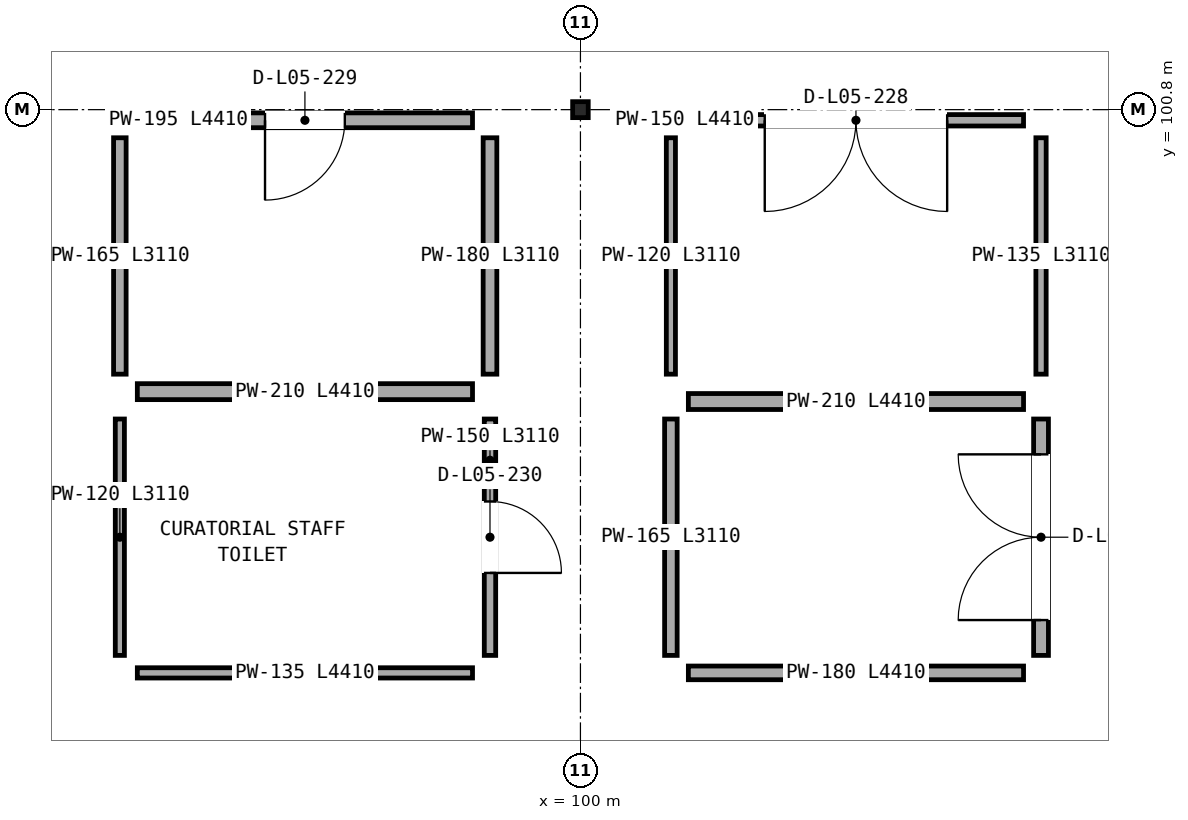
"""IFC4 building model, lengths in metres.
Left out: names, types, materials, properties, quantities, classifications, styles, units other than length and angle.
Written with IfcOpenShell. Run it as: python <this file> out.ifc"""

import sys

from ifc_helpers import new_model, si_unit, direction, frame, frame_2d, origin, origin_2d, place, context, subcontext, project, spatial, rectangle, i_section, extrude, element, fill, save


model = new_model("IFC4")
c1 = context("Model", 3, precision=1e-05, world=origin(), true_north=direction((0.0, 1.0)))
c2 = subcontext(c1, "Body", "Model", "MODEL_VIEW")
j1 = project(units=[si_unit("LENGTHUNIT", "METRE"), si_unit("PLANEANGLEUNIT", "RADIAN")], contexts=[c1])
p1 = place(None, origin())
s1 = spatial("IfcSite", under=j1, at=p1, CompositionType="ELEMENT")
p2 = place(p1, origin())
s2 = spatial("IfcBuilding", under=s1, at=p2, CompositionType="ELEMENT")
p3 = place(p2, frame((0.0, 0.0, 28.1)))
s3 = spatial("IfcBuildingStorey", under=s2, at=p3, CompositionType="ELEMENT", Elevation=28.1)
p4 = place(p3, frame((100.0, 100.8, 0.0), z_axis=(0.0, 0.0, 1.0), x_axis=(1.0, 0.0, 0.0)))
e1 = element("IfcColumn", 1, at=p4, inside=s3, PredefinedType="COLUMN", context=c2, shape_type="SweptSolid", body=[
    extrude(i_section(OverallWidth=0.205, OverallDepth=0.21, WebThickness=0.009, FlangeThickness=0.014, FilletRadius=0.01, at=origin_2d()), origin(), (0.0, 0.0, 1.0), 4.5),
])
p5 = place(p3, frame((101.42, 96.96, 0.0), z_axis=(0.0, 0.0, 1.0), x_axis=(1.0, 0.0, 0.0)))
e2 = element("IfcWall", 2, at=p5, inside=s3, PredefinedType="PARTITIONING", context=c2, shape_type="SweptSolid", body=[
    extrude(rectangle(XDim=4.41, YDim=0.21, at=frame_2d((2.205, 0.0))), origin(), (0.0, 0.0, 1.0), 3.913),
])
p6 = place(p3, frame((106.06, 96.73, 0.0), z_axis=(0.0, 0.0, 1.0), x_axis=(0.0, -1.0, 0.0)))
e3 = element("IfcWall", 3, at=p6, inside=s3, PredefinedType="PARTITIONING", context=c2, shape_type="SweptSolid", body=[
    extrude(rectangle(XDim=3.11, YDim=0.195, at=frame_2d((1.555, 0.0))), origin(), (0.0, 0.0, 1.0), 4.13),
])
p7 = place(p6, frame((0.465, 0.0, 0.0)))
e4 = element("IfcOpeningElement", 4, at=p7, cuts=e3, PredefinedType="OPENING", context=c2, shape_type="SweptSolid", body=[
    extrude(rectangle(XDim=2.18, YDim=2.58, at=frame_2d((1.09, 1.29))), frame((0.0, 0.107, 0.0), z_axis=(0.0, -1.0, 0.0), x_axis=(1.0, 0.0, 0.0)), (0.0, 0.0, 1.0), 0.215),
])
p8 = place(p3, frame((105.83, 93.39, 0.0), z_axis=(0.0, 0.0, 1.0), x_axis=(-1.0, 0.0, 0.0)))
e5 = element("IfcWall", 5, at=p8, inside=s3, PredefinedType="PARTITIONING", context=c2, shape_type="SweptSolid", body=[
    extrude(rectangle(XDim=4.41, YDim=0.18, at=frame_2d((2.205, 0.0))), origin(), (0.0, 0.0, 1.0), 3.913),
])
p9 = place(p3, frame((101.19, 93.62, 0.0), z_axis=(0.0, 0.0, 1.0), x_axis=(0.0, 1.0, 0.0)))
e6 = element("IfcWall", 6, at=p9, inside=s3, PredefinedType="PARTITIONING", context=c2, shape_type="SweptSolid", body=[
    extrude(rectangle(XDim=3.11, YDim=0.165, at=frame_2d((1.555, 0.0))), origin(), (0.0, 0.0, 1.0), 4.13),
])
p10 = place(p3, frame((101.42, 100.66, 0.0), z_axis=(0.0, 0.0, 1.0), x_axis=(1.0, 0.0, 0.0)))
e7 = element("IfcWall", 7, at=p10, inside=s3, PredefinedType="PARTITIONING", context=c2, shape_type="SweptSolid", body=[
    extrude(rectangle(XDim=4.41, YDim=0.15, at=frame_2d((2.205, 0.0))), origin(), (0.0, 0.0, 1.0), 3.687),
])
p11 = place(p10, frame((1.005, 0.0, 0.0)))
e8 = element("IfcOpeningElement", 8, at=p11, cuts=e7, PredefinedType="OPENING", context=c2, shape_type="SweptSolid", body=[
    extrude(rectangle(XDim=2.4, YDim=2.58, at=frame_2d((1.2, 1.29))), frame((0.0, 0.085, 0.0), z_axis=(0.0, -1.0, 0.0), x_axis=(1.0, 0.0, 0.0)), (0.0, 0.0, 1.0), 0.17),
])
p12 = place(p3, frame((106.06, 100.43, 0.0), z_axis=(0.0, 0.0, 1.0), x_axis=(0.0, -1.0, 0.0)))
e9 = element("IfcWall", 9, at=p12, inside=s3, PredefinedType="PARTITIONING", context=c2, shape_type="SweptSolid", body=[
    extrude(rectangle(XDim=3.11, YDim=0.135, at=frame_2d((1.555, 0.0))), origin(), (0.0, 0.0, 1.0), 4.13),
])
p13 = place(p3, frame((101.19, 97.32, 0.0), z_axis=(0.0, 0.0, 1.0), x_axis=(0.0, 1.0, 0.0)))
e10 = element("IfcWall", 10, at=p13, inside=s3, PredefinedType="PARTITIONING", context=c2, shape_type="SweptSolid", body=[
    extrude(rectangle(XDim=3.11, YDim=0.12, at=frame_2d((1.555, 0.0))), origin(), (0.0, 0.0, 1.0), 4.13),
])
p14 = place(p3, frame((98.58, 97.09, 0.0), z_axis=(0.0, 0.0, 1.0), x_axis=(-1.0, 0.0, 0.0)))
e11 = element("IfcWall", 11, at=p14, inside=s3, PredefinedType="PARTITIONING", context=c2, shape_type="SweptSolid", body=[
    extrude(rectangle(XDim=4.41, YDim=0.21, at=frame_2d((2.205, 0.0))), origin(), (0.0, 0.0, 1.0), 3.864),
])
p15 = place(p3, frame((94.17, 100.66, 0.0), z_axis=(0.0, 0.0, 1.0), x_axis=(1.0, 0.0, 0.0)))
e12 = element("IfcWall", 12, at=p15, inside=s3, PredefinedType="PARTITIONING", context=c2, shape_type="SweptSolid", body=[
    extrude(rectangle(XDim=4.41, YDim=0.195, at=frame_2d((2.205, 0.0))), origin(), (0.0, 0.0, 1.0), 3.687),
])
p16 = place(p15, frame((1.68, 0.0, 0.0)))
e13 = element("IfcOpeningElement", 13, at=p16, cuts=e12, PredefinedType="OPENING", context=c2, shape_type="SweptSolid", body=[
    extrude(rectangle(XDim=1.05, YDim=2.15, at=frame_2d((0.525, 1.075))), frame((0.0, 0.107, 0.0), z_axis=(0.0, -1.0, 0.0), x_axis=(1.0, 0.0, 0.0)), (0.0, 0.0, 1.0), 0.215),
])
p17 = place(p3, frame((98.81, 100.43, 0.0), z_axis=(0.0, 0.0, 1.0), x_axis=(0.0, -1.0, 0.0)))
e14 = element("IfcWall", 14, at=p17, inside=s3, PredefinedType="PARTITIONING", context=c2, shape_type="SweptSolid", body=[
    extrude(rectangle(XDim=3.11, YDim=0.18, at=frame_2d((1.555, 0.0))), origin(), (0.0, 0.0, 1.0), 4.13),
])
p18 = place(p3, frame((93.94, 97.32, 0.0), z_axis=(0.0, 0.0, 1.0), x_axis=(0.0, 1.0, 0.0)))
e15 = element("IfcWall", 15, at=p18, inside=s3, PredefinedType="PARTITIONING", context=c2, shape_type="SweptSolid", body=[
    extrude(rectangle(XDim=3.11, YDim=0.165, at=frame_2d((1.555, 0.0))), origin(), (0.0, 0.0, 1.0), 4.13),
])
p19 = place(p3, frame((98.81, 96.73, 0.0), z_axis=(0.0, 0.0, 1.0), x_axis=(0.0, -1.0, 0.0)))
e16 = element("IfcWall", 16, at=p19, inside=s3, PredefinedType="PARTITIONING", context=c2, shape_type="SweptSolid", body=[
    extrude(rectangle(XDim=3.11, YDim=0.15, at=frame_2d((1.555, 0.0))), origin(), (0.0, 0.0, 1.0), 4.13),
])
p20 = place(p19, frame((1.085, 0.0, 0.0)))
e17 = element("IfcOpeningElement", 17, at=p20, cuts=e16, PredefinedType="OPENING", context=c2, shape_type="SweptSolid", body=[
    extrude(rectangle(XDim=0.94, YDim=2.08, at=frame_2d((0.47, 1.04))), frame((0.0, 0.085, 0.0), z_axis=(0.0, -1.0, 0.0), x_axis=(1.0, 0.0, 0.0)), (0.0, 0.0, 1.0), 0.17),
])
p21 = place(p3, frame((98.58, 93.39, 0.0), z_axis=(0.0, 0.0, 1.0), x_axis=(-1.0, 0.0, 0.0)))
e18 = element("IfcWall", 18, at=p21, inside=s3, PredefinedType="PARTITIONING", context=c2, shape_type="SweptSolid", body=[
    extrude(rectangle(XDim=4.41, YDim=0.135, at=frame_2d((2.205, 0.0))), origin(), (0.0, 0.0, 1.0), 3.864),
])
p22 = place(p3, frame((93.94, 93.62, 0.0), z_axis=(0.0, 0.0, 1.0), x_axis=(0.0, 1.0, 0.0)))
e19 = element("IfcWall", 19, at=p22, inside=s3, PredefinedType="PARTITIONING", context=c2, shape_type="SweptSolid", body=[
    extrude(rectangle(XDim=3.11, YDim=0.12, at=frame_2d((1.555, 0.0))), origin(), (0.0, 0.0, 1.0), 4.13),
])
p23 = place(p7, frame((2.18, 0.0, 0.0), z_axis=(0.0, 0.0, 1.0), x_axis=(-1.0, 0.0, 0.0)))
e20 = element("IfcDoor", 20, at=p23, inside=s3, OperationType="DOUBLE_DOOR_SINGLE_SWING", PredefinedType="DOOR", context=c2, shape_type="SweptSolid", body=[
    extrude(rectangle(XDim=2.18, YDim=2.58, at=frame_2d((1.09, 1.29))), frame((0.0, 0.025, 0.0), z_axis=(0.0, -1.0, 0.0), x_axis=(1.0, 0.0, 0.0)), (0.0, 0.0, 1.0), 0.05),
])
fill(e4, e20)
p24 = place(p11, frame((2.4, 0.0, 0.0), z_axis=(0.0, 0.0, 1.0), x_axis=(-1.0, 0.0, 0.0)))
e21 = element("IfcDoor", 21, at=p24, inside=s3, OperationType="DOUBLE_DOOR_SINGLE_SWING", PredefinedType="DOOR", context=c2, shape_type="SweptSolid", body=[
    extrude(rectangle(XDim=2.4, YDim=2.58, at=frame_2d((1.2, 1.29))), frame((0.0, 0.025, 0.0), z_axis=(0.0, -1.0, 0.0), x_axis=(1.0, 0.0, 0.0)), (0.0, 0.0, 1.0), 0.05),
])
fill(e8, e21)
p25 = place(p16, frame((1.05, 0.0, 0.0), z_axis=(0.0, 0.0, 1.0), x_axis=(-1.0, 0.0, 0.0)))
e22 = element("IfcDoor", 22, at=p25, inside=s3, OperationType="SINGLE_SWING_LEFT", PredefinedType="DOOR", context=c2, shape_type="SweptSolid", body=[
    extrude(rectangle(XDim=1.05, YDim=2.15, at=frame_2d((0.525, 1.075))), frame((0.0, 0.025, 0.0), z_axis=(0.0, -1.0, 0.0), x_axis=(1.0, 0.0, 0.0)), (0.0, 0.0, 1.0), 0.05),
])
fill(e13, e22)
p26 = place(p20, origin())
e23 = element("IfcDoor", 23, at=p26, inside=s3, OperationType="SINGLE_SWING_RIGHT", PredefinedType="DOOR", context=c2, shape_type="SweptSolid", body=[
    extrude(rectangle(XDim=0.94, YDim=2.08, at=frame_2d((0.47, 1.04))), frame((0.0, 0.025, 0.0), z_axis=(0.0, -1.0, 0.0), x_axis=(1.0, 0.0, 0.0)), (0.0, 0.0, 1.0), 0.05),
])
fill(e17, e23)
save(model, sys.argv[1])
